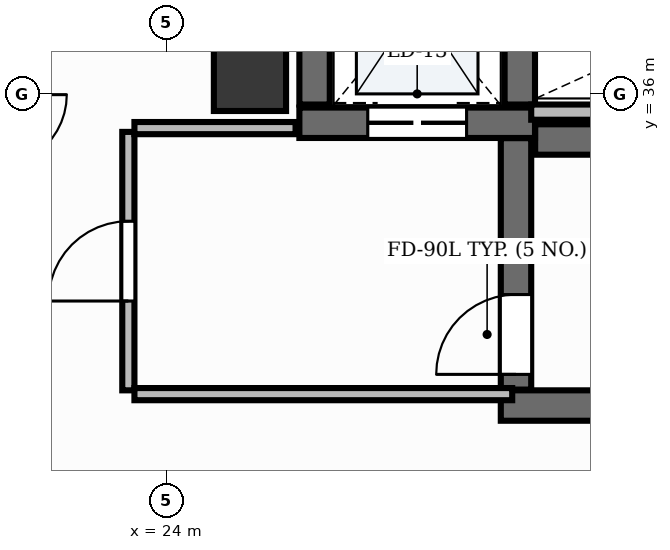
"""IFC4 building model, lengths in metres.
Left out: names, types, materials, properties, quantities, classifications, styles, units other than length and angle.
Written with IfcOpenShell. Run it as: python <this file> out.ifc"""

import sys

from ifc_helpers import new_model, si_unit, direction, frame, frame_2d, origin, origin_2d, place, context, subcontext, project, spatial, rectangle, extrude, element, fill, save


model = new_model("IFC4")
c1 = context("Model", 3, precision=1e-05, world=origin(), true_north=direction((0.0, 1.0)))
c2 = subcontext(c1, "Body", "Model", "MODEL_VIEW")
j1 = project(units=[si_unit("LENGTHUNIT", "METRE"), si_unit("PLANEANGLEUNIT", "RADIAN")], contexts=[c1])
p1 = place(None, origin())
s1 = spatial("IfcSite", under=j1, at=p1, CompositionType="ELEMENT")
p2 = place(p1, origin())
s2 = spatial("IfcBuilding", under=s1, at=p2, CompositionType="ELEMENT")
p3 = place(p2, frame((0.0, 0.0, 183.6)))
s3 = spatial("IfcBuildingStorey", under=s2, at=p3, CompositionType="ELEMENT", Elevation=183.6)
p4 = place(p3, frame((28.852, 35.4, 0.0), z_axis=(0.0, 0.0, 1.0), x_axis=(1.0, 0.0, 0.0)))
e1 = element("IfcWall", 1, at=p4, inside=s3, PredefinedType="SHEAR", context=c2, shape_type="SweptSolid", body=[
    extrude(rectangle(XDim=8.198, YDim=0.4, at=frame_2d((4.099, 0.0))), origin(), (0.0, 0.0, 1.0), 3.9),
])
p5 = place(p3, frame((28.4, 31.9, 0.0), z_axis=(0.0, 0.0, 1.0), x_axis=(1.0, 0.0, 0.0)))
e2 = element("IfcWall", 2, at=p5, inside=s3, PredefinedType="SHEAR", context=c2, shape_type="SweptSolid", body=[
    extrude(rectangle(XDim=8.65, YDim=0.4, at=frame_2d((4.325, 0.0))), origin(), (0.0, 0.0, 1.0), 3.9),
])
p6 = place(p3, frame((28.6, 32.11, 0.0), z_axis=(0.0, 0.0, 1.0), x_axis=(0.0, 1.0, 0.0)))
e3 = element("IfcWall", 3, at=p6, inside=s3, PredefinedType="SHEAR", context=c2, shape_type="SweptSolid", body=[
    extrude(rectangle(XDim=3.308, YDim=0.4, at=frame_2d((1.654, 0.0))), origin(), (0.0, 0.0, 1.0), 3.9),
])
p7 = place(p6, frame((0.2, 0.0, 0.0)))
e4 = element("IfcOpeningElement", 4, at=p7, cuts=e3, PredefinedType="OPENING", context=c2, shape_type="SweptSolid", body=[
    extrude(rectangle(XDim=1.05, YDim=2.15, at=frame_2d((0.525, 1.075))), frame((0.0, 0.215, 0.0), z_axis=(0.0, -1.0, 0.0), x_axis=(1.0, 0.0, 0.0)), (0.0, 0.0, 1.0), 0.43),
])
p8 = place(p3, frame((25.75, 35.62, 0.0), z_axis=(0.0, 0.0, 1.0), x_axis=(1.0, 0.0, 0.0)))
e5 = element("IfcWall", 5, at=p8, inside=s3, PredefinedType="SHEAR", context=c2, shape_type="SweptSolid", body=[
    extrude(rectangle(XDim=3.1, YDim=0.4, at=frame_2d((1.55, 0.0))), origin(), (0.0, 0.0, 1.0), 3.9),
])
p9 = place(p8, frame((0.9, 0.0, 0.0)))
e6 = element("IfcOpeningElement", 6, at=p9, cuts=e5, PredefinedType="OPENING", context=c2, shape_type="SweptSolid", body=[
    extrude(rectangle(XDim=1.3, YDim=2.2, at=frame_2d((0.65, 1.1))), frame((0.0, 0.215, 0.0), z_axis=(0.0, -1.0, 0.0), x_axis=(1.0, 0.0, 0.0)), (0.0, 0.0, 1.0), 0.43),
])
for number, where, z_axis, x_axis in (
    (7, (25.95, 35.86, 0.0), (0.0, 0.0, 1.0), (0.0, 1.0, 0.0)),
    (8, (28.65, 35.86, 0.0), (0.0, 0.0, 1.0), (0.0, 1.0, 0.0)),
):
    element("IfcWall", number, at=place(p3, frame(where, z_axis=z_axis, x_axis=x_axis)), inside=s3, PredefinedType="SHEAR", context=c2, shape_type="SweptSolid", body=[
        extrude(rectangle(XDim=2.7, YDim=0.4, at=frame_2d((1.35, 0.0))), origin(), (0.0, 0.0, 1.0), 3.9),
    ])
p10 = place(p3, frame((25.1, 36.25, -0.0), z_axis=(0.0, 0.0, 1.0), x_axis=(1.0, 0.0, 0.0)))
e9 = element("IfcColumn", 9, at=p10, inside=s3, PredefinedType="PILASTER", context=c2, shape_type="SweptSolid", body=[
    extrude(rectangle(XDim=0.95, YDim=0.95, at=origin_2d()), origin(), (0.0, 0.0, 1.0), 3.901),
])
p11 = place(p3, frame((28.8, 35.76, 0.0), z_axis=(0.0, 0.0, 1.0), x_axis=(1.0, 0.0, 0.0)))
e10 = element("IfcWall", 10, at=p11, inside=s3, PredefinedType="PARTITIONING", context=c2, shape_type="SweptSolid", body=[
    extrude(rectangle(XDim=4.57, YDim=0.2, at=frame_2d((2.285, 0.0))), origin(), (0.0, 0.0, 1.0), 2.91),
])
p12 = place(p3, frame((23.5, 32.1, 0.0), z_axis=(0.0, 0.0, 1.0), x_axis=(0.0, 1.0, 0.0)))
e11 = element("IfcWall", 11, at=p12, inside=s3, PredefinedType="PARTITIONING", context=c2, shape_type="SweptSolid", body=[
    extrude(rectangle(XDim=3.4, YDim=0.16, at=frame_2d((1.7, 0.0))), origin(), (0.0, 0.0, 1.0), 2.91),
])
p13 = place(p12, frame((1.175, 0.0, 0.0)))
e12 = element("IfcOpeningElement", 12, at=p13, cuts=e11, PredefinedType="OPENING", context=c2, shape_type="SweptSolid", body=[
    extrude(rectangle(XDim=1.05, YDim=2.15, at=frame_2d((0.525, 1.075))), frame((0.0, 0.095, 0.0), z_axis=(0.0, -1.0, 0.0), x_axis=(1.0, 0.0, 0.0)), (0.0, 0.0, 1.0), 0.19),
])
p14 = place(p3, frame((23.58, 32.05, 0.0), z_axis=(0.0, 0.0, 1.0), x_axis=(1.0, 0.0, 0.0)))
e13 = element("IfcWall", 13, at=p14, inside=s3, PredefinedType="PARTITIONING", context=c2, shape_type="SweptSolid", body=[
    extrude(rectangle(XDim=4.97, YDim=0.16, at=frame_2d((2.485, 0.0))), origin(), (0.0, 0.0, 1.0), 2.91),
])
p15 = place(p3, frame((23.58, 35.55, 0.0), z_axis=(0.0, 0.0, 1.0), x_axis=(1.0, 0.0, 0.0)))
e14 = element("IfcWall", 14, at=p15, inside=s3, PredefinedType="PARTITIONING", context=c2, shape_type="SweptSolid", body=[
    extrude(rectangle(XDim=2.12, YDim=0.16, at=frame_2d((1.06, 0.0))), origin(), (0.0, 0.0, 1.0), 2.91),
])
p16 = place(p7, origin())
e15 = element("IfcDoor", 15, at=p16, inside=s3, OperationType="SINGLE_SWING_LEFT", PredefinedType="DOOR", context=c2, shape_type="SweptSolid", body=[
    extrude(rectangle(XDim=1.05, YDim=2.15, at=frame_2d((0.525, 1.075))), frame((0.0, 0.025, 0.0), z_axis=(0.0, -1.0, 0.0), x_axis=(1.0, 0.0, 0.0)), (0.0, 0.0, 1.0), 0.05),
])
fill(e4, e15)
p17 = place(p9, origin())
e16 = element("IfcDoor", 16, at=p17, inside=s3, OperationType="DOUBLE_DOOR_SLIDING", PredefinedType="DOOR", context=c2, shape_type="SweptSolid", body=[
    extrude(rectangle(XDim=1.3, YDim=2.2, at=frame_2d((0.65, 1.1))), frame((0.0, 0.025, 0.0), z_axis=(0.0, -1.0, 0.0), x_axis=(1.0, 0.0, 0.0)), (0.0, 0.0, 1.0), 0.05),
])
fill(e6, e16)
p18 = place(p13, origin())
e17 = element("IfcDoor", 17, at=p18, inside=s3, OperationType="SINGLE_SWING_LEFT", PredefinedType="DOOR", context=c2, shape_type="SweptSolid", body=[
    extrude(rectangle(XDim=1.05, YDim=2.15, at=frame_2d((0.525, 1.075))), frame((0.0, 0.025, 0.0), z_axis=(0.0, -1.0, 0.0), x_axis=(1.0, 0.0, 0.0)), (0.0, 0.0, 1.0), 0.05),
])
fill(e12, e17)
save(model, sys.argv[1])
